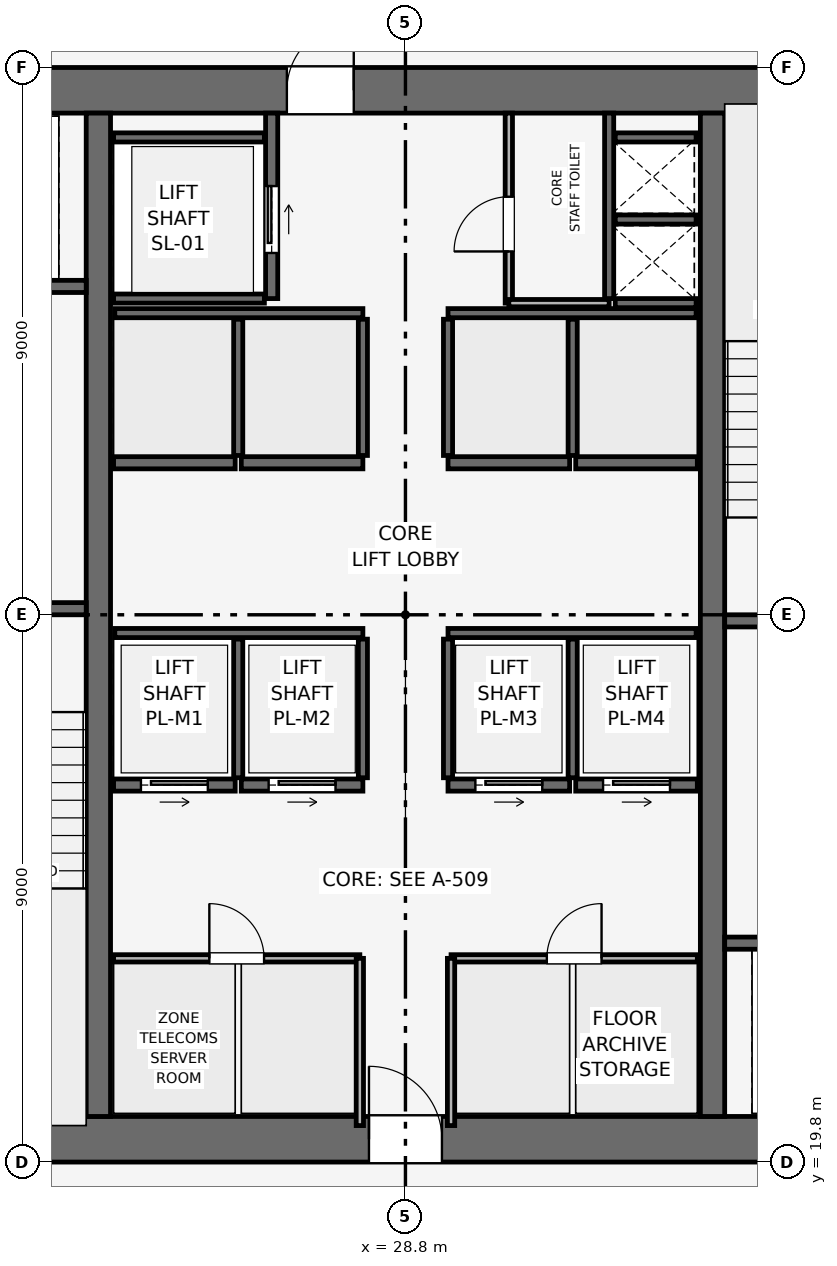
"""IFC4 building model, lengths in metres.
Left out: names, types, materials, properties, quantities, classifications, styles, units other than length and angle.
Written with IfcOpenShell. Run it as: python <this file> out.ifc"""

import sys

from ifc_helpers import new_model, si_unit, direction, frame, frame_2d, origin, place, context, subcontext, project, spatial, rectangle, extrude, element, fill, save


model = new_model("IFC4")
c1 = context("Model", 3, precision=1e-05, world=origin(), true_north=direction((0.0, 1.0)))
c2 = subcontext(c1, "Body", "Model", "MODEL_VIEW")
j1 = project(units=[si_unit("LENGTHUNIT", "METRE"), si_unit("PLANEANGLEUNIT", "RADIAN")], contexts=[c1])
p1 = place(None, origin())
s1 = spatial("IfcSite", under=j1, at=p1, CompositionType="ELEMENT")
p2 = place(p1, origin())
s2 = spatial("IfcBuilding", under=s1, at=p2, CompositionType="ELEMENT")
p3 = place(p2, frame((0.0, 0.0, 218.7)))
s3 = spatial("IfcBuildingStorey", under=s2, at=p3, CompositionType="ELEMENT", Elevation=218.7)
p4 = place(p3, frame((19.8, 20.175, 0.0), z_axis=(0.0, 0.0, 1.0), x_axis=(1.0, 0.0, 0.0)))
e1 = element("IfcWall", 1, at=p4, inside=s3, PredefinedType="SHEAR", context=c2, shape_type="SweptSolid", body=[
    extrude(rectangle(XDim=18.0, YDim=0.75, at=frame_2d((9.0, 0.0))), origin(), (0.0, 0.0, 1.0), 3.75),
])
p5 = place(p4, frame((8.4, 0.0, 0.0)))
e2 = element("IfcOpeningElement", 2, at=p5, cuts=e1, PredefinedType="OPENING", context=c2, shape_type="SweptSolid", body=[
    extrude(rectangle(XDim=1.2, YDim=2.2, at=frame_2d((0.6, 1.1))), frame((0.0, 0.385, 0.0), z_axis=(0.0, -1.0, 0.0), x_axis=(1.0, 0.0, 0.0)), (0.0, 0.0, 1.0), 0.77),
])
p6 = place(p3, frame((19.8, 37.425, 0.0), z_axis=(0.0, 0.0, 1.0), x_axis=(1.0, 0.0, 0.0)))
e3 = element("IfcWall", 3, at=p6, inside=s3, PredefinedType="SHEAR", context=c2, shape_type="SweptSolid", body=[
    extrude(rectangle(XDim=18.0, YDim=0.75, at=frame_2d((9.0, 0.0))), origin(), (0.0, 0.0, 1.0), 3.75),
])
p7 = place(p6, frame((7.05, 0.0, 0.0)))
e4 = element("IfcOpeningElement", 4, at=p7, cuts=e3, PredefinedType="OPENING", context=c2, shape_type="SweptSolid", body=[
    extrude(rectangle(XDim=1.1, YDim=2.15, at=frame_2d((0.55, 1.075))), frame((0.0, 0.385, 0.0), z_axis=(0.0, -1.0, 0.0), x_axis=(1.0, 0.0, 0.0)), (0.0, 0.0, 1.0), 0.77),
])
for number, where, z_axis, x_axis in (
    (5, (23.75, 20.55, 0.0), (0.0, 0.0, 1.0), (0.0, 1.0, 0.0)),
    (6, (33.85, 20.55, 0.0), (0.0, 0.0, 1.0), (0.0, 1.0, 0.0)),
):
    element("IfcWall", number, at=place(p3, frame(where, z_axis=z_axis, x_axis=x_axis)), inside=s3, PredefinedType="SHEAR", context=c2, shape_type="SweptSolid", body=[
        extrude(rectangle(XDim=16.5, YDim=0.4, at=frame_2d((8.25, 0.0))), origin(), (0.0, 0.0, 1.0), 3.75),
    ])
p8 = place(p3, frame((20.4, 28.9, 0.0), z_axis=(0.0, 0.0, 1.0), x_axis=(1.0, 0.0, 0.0)))
e7 = element("IfcWall", 7, at=p8, inside=s3, PredefinedType="SHEAR", context=c2, shape_type="SweptSolid", body=[
    extrude(rectangle(XDim=3.15, YDim=0.2, at=frame_2d((1.575, 0.0))), origin(), (0.0, 0.0, 1.0), 3.5),
])
p9 = place(p8, frame((0.8, 0.0, 0.0)))
e8 = element("IfcOpeningElement", 8, at=p9, cuts=e7, PredefinedType="OPENING", context=c2, shape_type="SweptSolid", body=[
    extrude(rectangle(XDim=1.0, YDim=2.1, at=frame_2d((0.5, 1.05))), frame((0.0, 0.11, 0.0), z_axis=(0.0, -1.0, 0.0), x_axis=(1.0, 0.0, 0.0)), (0.0, 0.0, 1.0), 0.22),
])
p10 = place(p3, frame((34.05, 28.7, 0.0), z_axis=(0.0, 0.0, 1.0), x_axis=(1.0, 0.0, 0.0)))
e9 = element("IfcWall", 9, at=p10, inside=s3, PredefinedType="SHEAR", context=c2, shape_type="SweptSolid", body=[
    extrude(rectangle(XDim=3.15, YDim=0.2, at=frame_2d((1.575, 0.0))), origin(), (0.0, 0.0, 1.0), 3.5),
])
p11 = place(p10, frame((0.8, 0.0, 0.0)))
e10 = element("IfcOpeningElement", 10, at=p11, cuts=e9, PredefinedType="OPENING", context=c2, shape_type="SweptSolid", body=[
    extrude(rectangle(XDim=1.0, YDim=2.1, at=frame_2d((0.5, 1.05))), frame((0.0, 0.11, 0.0), z_axis=(0.0, -1.0, 0.0), x_axis=(1.0, 0.0, 0.0)), (0.0, 0.0, 1.0), 0.22),
])
p12 = place(p3, frame((32.15, 34.0, 0.0), z_axis=(0.0, 0.0, 1.0), x_axis=(0.0, 1.0, 0.0)))
e11 = element("IfcWall", 11, at=p12, inside=s3, PredefinedType="SHEAR", context=c2, shape_type="SweptSolid", body=[
    extrude(rectangle(XDim=3.05, YDim=0.15, at=frame_2d((1.525, 0.0))), origin(), (0.0, 0.0, 1.0), 3.5),
])
for number, where, z_axis, x_axis in (
    (12, (32.25, 33.925, 0.0), (0.0, 0.0, 1.0), (1.0, 0.0, 0.0)),
    (13, (32.25, 35.3, 0.0), (0.0, 0.0, 1.0), (1.0, 0.0, 0.0)),
):
    element("IfcWall", number, at=place(p3, frame(where, z_axis=z_axis, x_axis=x_axis)), inside=s3, PredefinedType="SHEAR", context=c2, shape_type="SweptSolid", body=[
        extrude(rectangle(XDim=1.33, YDim=0.15, at=frame_2d((0.665, 0.0))), origin(), (0.0, 0.0, 1.0), 3.5),
    ])
p13 = place(p3, frame((20.5, 34.2, 0.0), z_axis=(0.0, 0.0, 1.0), x_axis=(1.0, 0.0, 0.0)))
e14 = element("IfcWall", 14, at=p13, inside=s3, PredefinedType="SHEAR", context=c2, shape_type="SweptSolid", body=[
    extrude(rectangle(XDim=3.05, YDim=0.2, at=frame_2d((1.525, 0.0))), origin(), (0.0, 0.0, 1.0), 3.5),
])
p14 = place(p13, frame((0.75, 0.0, 0.0)))
e15 = element("IfcOpeningElement", 15, at=p14, cuts=e14, PredefinedType="OPENING", context=c2, shape_type="SweptSolid", body=[
    extrude(rectangle(XDim=1.1, YDim=2.15, at=frame_2d((0.55, 1.075))), frame((0.0, 0.11, 0.0), z_axis=(0.0, -1.0, 0.0), x_axis=(1.0, 0.0, 0.0)), (0.0, 0.0, 1.0), 0.22),
])
p15 = place(p3, frame((34.05, 23.4, 0.0), z_axis=(0.0, 0.0, 1.0), x_axis=(1.0, 0.0, 0.0)))
e16 = element("IfcWall", 16, at=p15, inside=s3, PredefinedType="SHEAR", context=c2, shape_type="SweptSolid", body=[
    extrude(rectangle(XDim=3.05, YDim=0.2, at=frame_2d((1.525, 0.0))), origin(), (0.0, 0.0, 1.0), 3.5),
])
p16 = place(p15, frame((1.2, 0.0, 0.0)))
e17 = element("IfcOpeningElement", 17, at=p16, cuts=e16, PredefinedType="OPENING", context=c2, shape_type="SweptSolid", body=[
    extrude(rectangle(XDim=1.1, YDim=2.15, at=frame_2d((0.55, 1.075))), frame((0.0, 0.11, 0.0), z_axis=(0.0, -1.0, 0.0), x_axis=(1.0, 0.0, 0.0)), (0.0, 0.0, 1.0), 0.22),
])
p17 = place(p3, frame((26.6, 34.0, 0.0), z_axis=(0.0, 0.0, 1.0), x_axis=(0.0, 1.0, 0.0)))
e18 = element("IfcWall", 18, at=p17, inside=s3, PredefinedType="SHEAR", context=c2, shape_type="SweptSolid", body=[
    extrude(rectangle(XDim=3.05, YDim=0.2, at=frame_2d((1.525, 0.0))), origin(), (0.0, 0.0, 1.0), 3.5),
])
p18 = place(p17, frame((0.75, 0.0, 0.0)))
e19 = element("IfcOpeningElement", 19, at=p18, cuts=e18, PredefinedType="OPENING", context=c2, shape_type="SweptSolid", body=[
    extrude(rectangle(XDim=1.1, YDim=2.15, at=frame_2d((0.55, 1.075))), frame((0.0, 0.11, 0.0), z_axis=(0.0, -1.0, 0.0), x_axis=(1.0, 0.0, 0.0)), (0.0, 0.0, 1.0), 0.22),
])
for number, where, z_axis, x_axis in (
    (20, (24.0, 34.0, 0.0), (0.0, 0.0, 1.0), (1.0, 0.0, 0.0)),
    (21, (24.0, 36.65, 0.0), (0.0, 0.0, 1.0), (1.0, 0.0, 0.0)),
):
    element("IfcWall", number, at=place(p3, frame(where, z_axis=z_axis, x_axis=x_axis)), inside=s3, PredefinedType="SHEAR", context=c2, shape_type="SweptSolid", body=[
        extrude(rectangle(XDim=2.48, YDim=0.15, at=frame_2d((1.24, 0.0))), origin(), (0.0, 0.0, 1.0), 3.5),
    ])
p19 = place(p3, frame((24.0, 26.0, 0.0), z_axis=(0.0, 0.0, 1.0), x_axis=(1.0, 0.0, 0.0)))
e22 = element("IfcWall", 22, at=p19, inside=s3, PredefinedType="SHEAR", context=c2, shape_type="SweptSolid", body=[
    extrude(rectangle(XDim=2.0, YDim=0.2, at=frame_2d((1.0, 0.0))), origin(), (0.0, 0.0, 1.0), 3.5),
])
p20 = place(p19, frame((0.45, 0.0, 0.0)))
e23 = element("IfcOpeningElement", 23, at=p20, cuts=e22, PredefinedType="OPENING", context=c2, shape_type="SweptSolid", body=[
    extrude(rectangle(XDim=1.1, YDim=2.15, at=frame_2d((0.55, 1.075))), frame((0.0, 0.11, 0.0), z_axis=(0.0, -1.0, 0.0), x_axis=(1.0, 0.0, 0.0)), (0.0, 0.0, 1.0), 0.22),
])
p21 = place(p3, frame((26.1, 26.0, 0.0), z_axis=(0.0, 0.0, 1.0), x_axis=(1.0, 0.0, 0.0)))
e24 = element("IfcWall", 24, at=p21, inside=s3, PredefinedType="SHEAR", context=c2, shape_type="SweptSolid", body=[
    extrude(rectangle(XDim=2.0, YDim=0.2, at=frame_2d((1.0, 0.0))), origin(), (0.0, 0.0, 1.0), 3.5),
])
p22 = place(p21, frame((0.45, 0.0, 0.0)))
e25 = element("IfcOpeningElement", 25, at=p22, cuts=e24, PredefinedType="OPENING", context=c2, shape_type="SweptSolid", body=[
    extrude(rectangle(XDim=1.1, YDim=2.15, at=frame_2d((0.55, 1.075))), frame((0.0, 0.11, 0.0), z_axis=(0.0, -1.0, 0.0), x_axis=(1.0, 0.0, 0.0)), (0.0, 0.0, 1.0), 0.22),
])
p23 = place(p3, frame((29.5, 26.0, 0.0), z_axis=(0.0, 0.0, 1.0), x_axis=(1.0, 0.0, 0.0)))
e26 = element("IfcWall", 26, at=p23, inside=s3, PredefinedType="SHEAR", context=c2, shape_type="SweptSolid", body=[
    extrude(rectangle(XDim=2.0, YDim=0.2, at=frame_2d((1.0, 0.0))), origin(), (0.0, 0.0, 1.0), 3.5),
])
p24 = place(p23, frame((0.45, 0.0, 0.0)))
e27 = element("IfcOpeningElement", 27, at=p24, cuts=e26, PredefinedType="OPENING", context=c2, shape_type="SweptSolid", body=[
    extrude(rectangle(XDim=1.1, YDim=2.15, at=frame_2d((0.55, 1.075))), frame((0.0, 0.11, 0.0), z_axis=(0.0, -1.0, 0.0), x_axis=(1.0, 0.0, 0.0)), (0.0, 0.0, 1.0), 0.22),
])
p25 = place(p3, frame((31.6, 26.0, 0.0), z_axis=(0.0, 0.0, 1.0), x_axis=(1.0, 0.0, 0.0)))
e28 = element("IfcWall", 28, at=p25, inside=s3, PredefinedType="SHEAR", context=c2, shape_type="SweptSolid", body=[
    extrude(rectangle(XDim=2.0, YDim=0.2, at=frame_2d((1.0, 0.0))), origin(), (0.0, 0.0, 1.0), 3.5),
])
p26 = place(p25, frame((0.45, 0.0, 0.0)))
e29 = element("IfcOpeningElement", 29, at=p26, cuts=e28, PredefinedType="OPENING", context=c2, shape_type="SweptSolid", body=[
    extrude(rectangle(XDim=1.1, YDim=2.15, at=frame_2d((0.55, 1.075))), frame((0.0, 0.11, 0.0), z_axis=(0.0, -1.0, 0.0), x_axis=(1.0, 0.0, 0.0)), (0.0, 0.0, 1.0), 0.22),
])
for number, where, z_axis, x_axis in (
    (30, (24.0, 31.3, 0.0), (0.0, 0.0, 1.0), (1.0, 0.0, 0.0)),
    (31, (26.1, 31.3, 0.0), (0.0, 0.0, 1.0), (1.0, 0.0, 0.0)),
    (32, (29.5, 31.3, 0.0), (0.0, 0.0, 1.0), (1.0, 0.0, 0.0)),
    (33, (31.6, 31.3, 0.0), (0.0, 0.0, 1.0), (1.0, 0.0, 0.0)),
):
    element("IfcWall", number, at=place(p3, frame(where, z_axis=z_axis, x_axis=x_axis)), inside=s3, PredefinedType="SHEAR", context=c2, shape_type="SweptSolid", body=[
        extrude(rectangle(XDim=2.0, YDim=0.2, at=frame_2d((1.0, 0.0))), origin(), (0.0, 0.0, 1.0), 3.5),
    ])
p27 = place(p3, frame((32.25, 36.65, 0.0), z_axis=(0.0, 0.0, 1.0), x_axis=(1.0, 0.0, 0.0)))
e34 = element("IfcWall", 34, at=p27, inside=s3, PredefinedType="SHEAR", context=c2, shape_type="SweptSolid", body=[
    extrude(rectangle(XDim=1.33, YDim=0.15, at=frame_2d((0.665, 0.0))), origin(), (0.0, 0.0, 1.0), 3.5),
])
for number, where, z_axis, x_axis in (
    (35, (24.02, 28.5, 0.0), (0.0, 0.0, 1.0), (1.0, 0.0, 0.0)),
    (36, (29.5, 28.5, 0.0), (0.0, 0.0, 1.0), (1.0, 0.0, 0.0)),
):
    element("IfcWall", number, at=place(p3, frame(where, z_axis=z_axis, x_axis=x_axis)), inside=s3, PredefinedType="SHEAR", context=c2, shape_type="SweptSolid", body=[
        extrude(rectangle(XDim=4.08, YDim=0.15, at=frame_2d((2.04, 0.0))), origin(), (0.0, 0.0, 1.0), 3.5),
    ])
for number, where, z_axis, x_axis in (
    (37, (26.05, 26.12, 0.0), (0.0, 0.0, 1.0), (0.0, 1.0, 0.0)),
    (38, (28.1, 26.12, 0.0), (0.0, 0.0, 1.0), (0.0, 1.0, 0.0)),
    (39, (29.5, 26.12, 0.0), (0.0, 0.0, 1.0), (0.0, 1.0, 0.0)),
    (40, (31.55, 26.12, 0.0), (0.0, 0.0, 1.0), (0.0, 1.0, 0.0)),
):
    element("IfcWall", number, at=place(p3, frame(where, z_axis=z_axis, x_axis=x_axis)), inside=s3, PredefinedType="SHEAR", context=c2, shape_type="SweptSolid", body=[
        extrude(rectangle(XDim=2.28, YDim=0.15, at=frame_2d((1.14, 0.0))), origin(), (0.0, 0.0, 1.0), 3.5),
    ])
for number, where, z_axis, x_axis in (
    (41, (24.02, 33.76, 0.0), (0.0, 0.0, 1.0), (1.0, 0.0, 0.0)),
    (42, (29.5, 33.76, 0.0), (0.0, 0.0, 1.0), (1.0, 0.0, 0.0)),
):
    element("IfcWall", number, at=place(p3, frame(where, z_axis=z_axis, x_axis=x_axis)), inside=s3, PredefinedType="SHEAR", context=c2, shape_type="SweptSolid", body=[
        extrude(rectangle(XDim=4.08, YDim=0.15, at=frame_2d((2.04, 0.0))), origin(), (0.0, 0.0, 1.0), 3.5),
    ])
for number, where, z_axis, x_axis in (
    (43, (26.05, 31.42, 0.0), (0.0, 0.0, 1.0), (0.0, 1.0, 0.0)),
    (44, (28.1, 31.42, 0.0), (0.0, 0.0, 1.0), (0.0, 1.0, 0.0)),
    (45, (29.5, 31.42, 0.0), (0.0, 0.0, 1.0), (0.0, 1.0, 0.0)),
    (46, (31.55, 31.42, 0.0), (0.0, 0.0, 1.0), (0.0, 1.0, 0.0)),
):
    element("IfcWall", number, at=place(p3, frame(where, z_axis=z_axis, x_axis=x_axis)), inside=s3, PredefinedType="SHEAR", context=c2, shape_type="SweptSolid", body=[
        extrude(rectangle(XDim=2.24, YDim=0.15, at=frame_2d((1.12, 0.0))), origin(), (0.0, 0.0, 1.0), 3.5),
    ])
p28 = place(p3, frame((30.5, 33.925, 0.0), z_axis=(0.0, 0.0, 1.0), x_axis=(0.0, 1.0, 0.0)))
e47 = element("IfcWall", 47, at=p28, inside=s3, PredefinedType="PARTITIONING", context=c2, shape_type="SweptSolid", body=[
    extrude(rectangle(XDim=3.125, YDim=0.12, at=frame_2d((1.562, 0.0))), origin(), (0.0, 0.0, 1.0), 3.5),
])
p29 = place(p28, frame((0.85, 0.0, 0.0)))
e48 = element("IfcOpeningElement", 48, at=p29, cuts=e47, PredefinedType="OPENING", context=c2, shape_type="SweptSolid", body=[
    extrude(rectangle(XDim=0.9, YDim=2.1, at=frame_2d((0.45, 1.05))), frame((0.0, 0.07, 0.0), z_axis=(0.0, -1.0, 0.0), x_axis=(1.0, 0.0, 0.0)), (0.0, 0.0, 1.0), 0.14),
])
p30 = place(p3, frame((30.5, 33.925, 0.0), z_axis=(0.0, 0.0, 1.0), x_axis=(1.0, 0.0, 0.0)))
e49 = element("IfcWall", 49, at=p30, inside=s3, PredefinedType="PARTITIONING", context=c2, shape_type="SweptSolid", body=[
    extrude(rectangle(XDim=1.65, YDim=0.12, at=frame_2d((0.825, 0.0))), origin(), (0.0, 0.0, 1.0), 3.5),
])
p31 = place(p3, frame((24.0, 23.15, 0.0), z_axis=(0.0, 0.0, 1.0), x_axis=(1.0, 0.0, 0.0)))
e50 = element("IfcWall", 50, at=p31, inside=s3, PredefinedType="PARTITIONING", context=c2, shape_type="SweptSolid", body=[
    extrude(rectangle(XDim=4.05, YDim=0.12, at=frame_2d((2.025, 0.0))), origin(), (0.0, 0.0, 1.0), 3.5),
])
p32 = place(p31, frame((1.575, 0.0, 0.0)))
e51 = element("IfcOpeningElement", 51, at=p32, cuts=e50, PredefinedType="OPENING", context=c2, shape_type="SweptSolid", body=[
    extrude(rectangle(XDim=0.9, YDim=2.1, at=frame_2d((0.45, 1.05))), frame((0.0, 0.07, 0.0), z_axis=(0.0, -1.0, 0.0), x_axis=(1.0, 0.0, 0.0)), (0.0, 0.0, 1.0), 0.14),
])
p33 = place(p3, frame((28.05, 20.4, 0.0), z_axis=(0.0, 0.0, 1.0), x_axis=(0.0, 1.0, 0.0)))
e52 = element("IfcWall", 52, at=p33, inside=s3, PredefinedType="PARTITIONING", context=c2, shape_type="SweptSolid", body=[
    extrude(rectangle(XDim=2.75, YDim=0.12, at=frame_2d((1.375, 0.0))), origin(), (0.0, 0.0, 1.0), 3.5),
])
p34 = place(p3, frame((29.55, 23.15, 0.0), z_axis=(0.0, 0.0, 1.0), x_axis=(1.0, 0.0, 0.0)))
e53 = element("IfcWall", 53, at=p34, inside=s3, PredefinedType="PARTITIONING", context=c2, shape_type="SweptSolid", body=[
    extrude(rectangle(XDim=4.05, YDim=0.12, at=frame_2d((2.025, 0.0))), origin(), (0.0, 0.0, 1.0), 3.5),
])
p35 = place(p34, frame((1.575, 0.0, 0.0)))
e54 = element("IfcOpeningElement", 54, at=p35, cuts=e53, PredefinedType="OPENING", context=c2, shape_type="SweptSolid", body=[
    extrude(rectangle(XDim=0.9, YDim=2.1, at=frame_2d((0.45, 1.05))), frame((0.0, 0.07, 0.0), z_axis=(0.0, -1.0, 0.0), x_axis=(1.0, 0.0, 0.0)), (0.0, 0.0, 1.0), 0.14),
])
p36 = place(p3, frame((29.55, 20.4, 0.0), z_axis=(0.0, 0.0, 1.0), x_axis=(0.0, 1.0, 0.0)))
e55 = element("IfcWall", 55, at=p36, inside=s3, PredefinedType="PARTITIONING", context=c2, shape_type="SweptSolid", body=[
    extrude(rectangle(XDim=2.75, YDim=0.12, at=frame_2d((1.375, 0.0))), origin(), (0.0, 0.0, 1.0), 3.5),
])
p37 = place(p18, origin())
e56 = element("IfcDoor", 56, at=p37, inside=s3, OperationType="SLIDING_TO_RIGHT", PredefinedType="DOOR", context=c2, shape_type="SweptSolid", body=[
    extrude(rectangle(XDim=1.1, YDim=2.15, at=frame_2d((0.55, 1.075))), frame((0.0, 0.025, 0.0), z_axis=(0.0, -1.0, 0.0), x_axis=(1.0, 0.0, 0.0)), (0.0, 0.0, 1.0), 0.05),
])
fill(e19, e56)
p38 = place(p20, origin())
e57 = element("IfcDoor", 57, at=p38, inside=s3, OperationType="SLIDING_TO_RIGHT", PredefinedType="DOOR", context=c2, shape_type="SweptSolid", body=[
    extrude(rectangle(XDim=1.1, YDim=2.15, at=frame_2d((0.55, 1.075))), frame((0.0, 0.025, 0.0), z_axis=(0.0, -1.0, 0.0), x_axis=(1.0, 0.0, 0.0)), (0.0, 0.0, 1.0), 0.05),
])
fill(e23, e57)
p39 = place(p22, origin())
e58 = element("IfcDoor", 58, at=p39, inside=s3, OperationType="SLIDING_TO_RIGHT", PredefinedType="DOOR", context=c2, shape_type="SweptSolid", body=[
    extrude(rectangle(XDim=1.1, YDim=2.15, at=frame_2d((0.55, 1.075))), frame((0.0, 0.025, 0.0), z_axis=(0.0, -1.0, 0.0), x_axis=(1.0, 0.0, 0.0)), (0.0, 0.0, 1.0), 0.05),
])
fill(e25, e58)
p40 = place(p24, origin())
e59 = element("IfcDoor", 59, at=p40, inside=s3, OperationType="SLIDING_TO_RIGHT", PredefinedType="DOOR", context=c2, shape_type="SweptSolid", body=[
    extrude(rectangle(XDim=1.1, YDim=2.15, at=frame_2d((0.55, 1.075))), frame((0.0, 0.025, 0.0), z_axis=(0.0, -1.0, 0.0), x_axis=(1.0, 0.0, 0.0)), (0.0, 0.0, 1.0), 0.05),
])
fill(e27, e59)
p41 = place(p26, origin())
e60 = element("IfcDoor", 60, at=p41, inside=s3, OperationType="SLIDING_TO_RIGHT", PredefinedType="DOOR", context=c2, shape_type="SweptSolid", body=[
    extrude(rectangle(XDim=1.1, YDim=2.15, at=frame_2d((0.55, 1.075))), frame((0.0, 0.025, 0.0), z_axis=(0.0, -1.0, 0.0), x_axis=(1.0, 0.0, 0.0)), (0.0, 0.0, 1.0), 0.05),
])
fill(e29, e60)
p42 = place(p29, origin())
e61 = element("IfcDoor", 61, at=p42, inside=s3, OperationType="SINGLE_SWING_LEFT", PredefinedType="DOOR", context=c2, shape_type="SweptSolid", body=[
    extrude(rectangle(XDim=0.9, YDim=2.1, at=frame_2d((0.45, 1.05))), frame((0.0, 0.025, 0.0), z_axis=(0.0, -1.0, 0.0), x_axis=(1.0, 0.0, 0.0)), (0.0, 0.0, 1.0), 0.05),
])
fill(e48, e61)
p43 = place(p32, origin())
e62 = element("IfcDoor", 62, at=p43, inside=s3, OperationType="SINGLE_SWING_LEFT", PredefinedType="DOOR", context=c2, shape_type="SweptSolid", body=[
    extrude(rectangle(XDim=0.9, YDim=2.1, at=frame_2d((0.45, 1.05))), frame((0.0, 0.025, 0.0), z_axis=(0.0, -1.0, 0.0), x_axis=(1.0, 0.0, 0.0)), (0.0, 0.0, 1.0), 0.05),
])
fill(e51, e62)
p44 = place(p35, origin())
e63 = element("IfcDoor", 63, at=p44, inside=s3, OperationType="SINGLE_SWING_RIGHT", PredefinedType="DOOR", context=c2, shape_type="SweptSolid", body=[
    extrude(rectangle(XDim=0.9, YDim=2.1, at=frame_2d((0.45, 1.05))), frame((0.0, 0.025, 0.0), z_axis=(0.0, -1.0, 0.0), x_axis=(1.0, 0.0, 0.0)), (0.0, 0.0, 1.0), 0.05),
])
fill(e54, e63)
p45 = place(p5, origin())
e64 = element("IfcDoor", 64, at=p45, inside=s3, OperationType="SINGLE_SWING_LEFT", PredefinedType="DOOR", context=c2, shape_type="SweptSolid", body=[
    extrude(rectangle(XDim=1.2, YDim=2.2, at=frame_2d((0.6, 1.1))), frame((0.0, 0.025, 0.0), z_axis=(0.0, -1.0, 0.0), x_axis=(1.0, 0.0, 0.0)), (0.0, 0.0, 1.0), 0.05),
])
fill(e2, e64)
p46 = place(p7, origin())
e65 = element("IfcDoor", 65, at=p46, inside=s3, OperationType="SINGLE_SWING_RIGHT", PredefinedType="DOOR", context=c2, shape_type="SweptSolid", body=[
    extrude(rectangle(XDim=1.1, YDim=2.15, at=frame_2d((0.55, 1.075))), frame((0.0, 0.025, 0.0), z_axis=(0.0, -1.0, 0.0), x_axis=(1.0, 0.0, 0.0)), (0.0, 0.0, 1.0), 0.05),
])
fill(e4, e65)
save(model, sys.argv[1])
